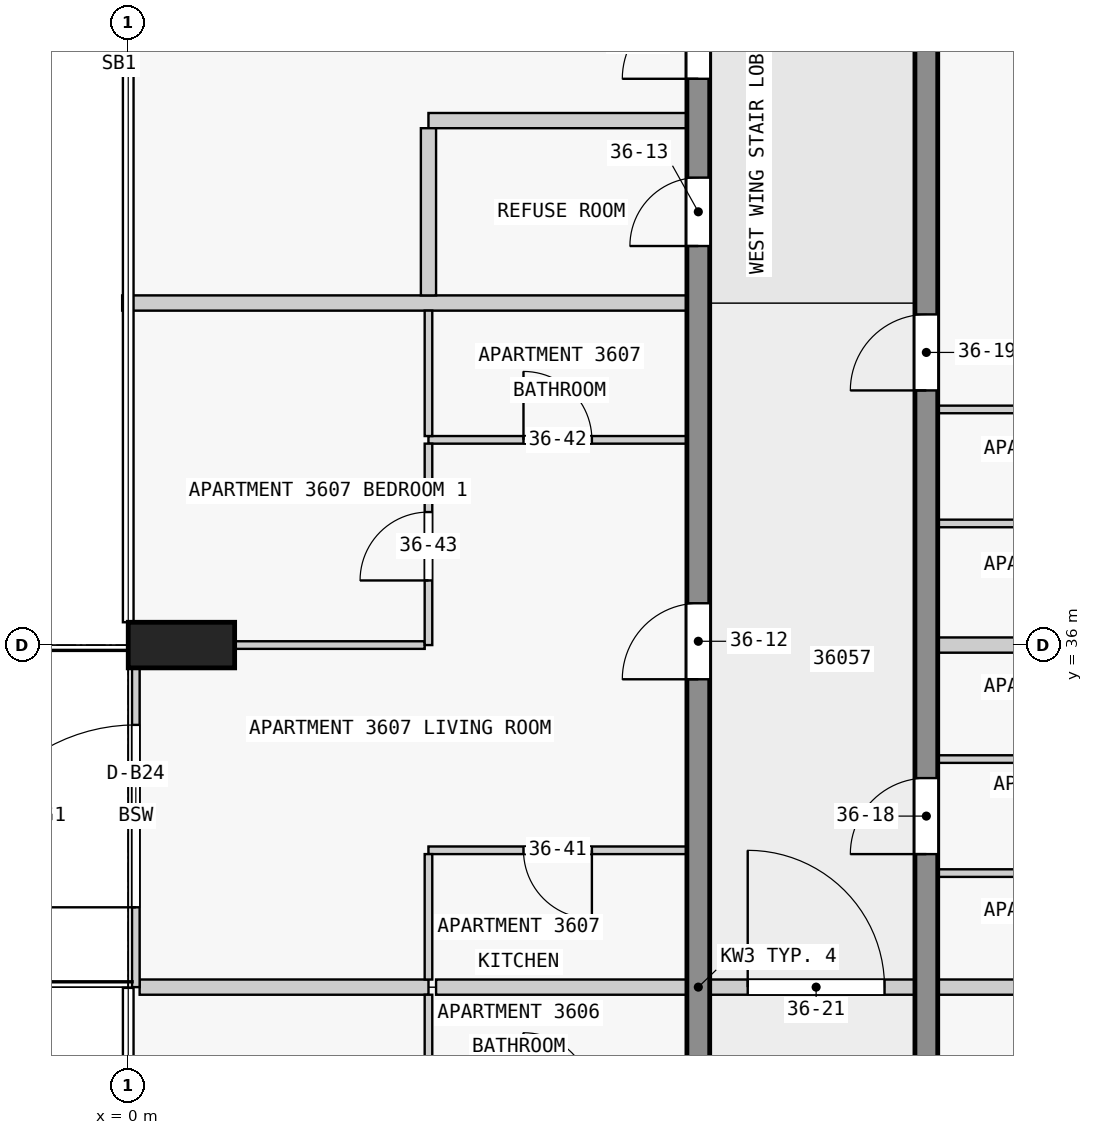
"""IFC4 building model, lengths in metres.
Left out: names, types, materials, properties, quantities, classifications, styles, units other than length and angle.
Written with IfcOpenShell. Run it as: python <this file> out.ifc"""

import sys

from ifc_helpers import new_model, si_unit, direction, frame, frame_2d, origin, origin_2d, place, context, subcontext, project, spatial, rectangle, extrude, element, fill, save


model = new_model("IFC4")
c1 = context("Model", 3, precision=1e-05, world=origin(), true_north=direction((0.0, 1.0)))
c2 = subcontext(c1, "Body", "Model", "MODEL_VIEW")
j1 = project(units=[si_unit("LENGTHUNIT", "METRE"), si_unit("PLANEANGLEUNIT", "RADIAN")], contexts=[c1])
p1 = place(None, origin())
s1 = spatial("IfcSite", under=j1, at=p1, CompositionType="ELEMENT")
p2 = place(p1, origin())
s2 = spatial("IfcBuilding", under=s1, at=p2, CompositionType="ELEMENT")
p3 = place(p2, frame((0.0, 0.0, 142.9)))
s3 = spatial("IfcBuildingStorey", under=s2, at=p3, CompositionType="ELEMENT", Elevation=142.9)
p4 = place(p3, frame((0.7, 36.0, 0.0), z_axis=(0.0, 0.0, 1.0), x_axis=(0.0, 1.0, 0.0)))
e1 = element("IfcColumn", 1, at=p4, inside=s3, PredefinedType="COLUMN", context=c2, shape_type="SweptSolid", body=[
    extrude(rectangle(XDim=0.6, YDim=1.4, at=origin_2d()), origin(), (0.0, 0.0, 1.0), 3.5),
])
p5 = place(p3, frame((7.5, 18.0, 0.0), z_axis=(0.0, 0.0, 1.0), x_axis=(0.0, 1.0, 0.0)))
e2 = element("IfcWall", 2, at=p5, inside=s3, PredefinedType="SHEAR", context=c2, shape_type="SweptSolid", body=[
    extrude(rectangle(XDim=27.0, YDim=0.3, at=frame_2d((13.5, 0.0))), origin(), (0.0, 0.0, 1.0), 3.25),
])
p6 = place(p5, frame((4.05, 0.0, 0.0)))
e3 = element("IfcOpeningElement", 3, at=p6, cuts=e2, PredefinedType="OPENING", context=c2, shape_type="SweptSolid", body=[
    extrude(rectangle(XDim=1.0, YDim=2.1, at=frame_2d((0.5, 1.05))), frame((0.0, 0.16, 0.0), z_axis=(0.0, -1.0, 0.0), x_axis=(1.0, 0.0, 0.0)), (0.0, 0.0, 1.0), 0.32),
])
p7 = place(p5, frame((10.75, 0.0, 0.0)))
e4 = element("IfcOpeningElement", 4, at=p7, cuts=e2, PredefinedType="OPENING", context=c2, shape_type="SweptSolid", body=[
    extrude(rectangle(XDim=1.0, YDim=2.1, at=frame_2d((0.5, 1.05))), frame((0.0, 0.16, 0.0), z_axis=(0.0, -1.0, 0.0), x_axis=(1.0, 0.0, 0.0)), (0.0, 0.0, 1.0), 0.32),
])
p8 = place(p5, frame((17.55, 0.0, 0.0)))
e5 = element("IfcOpeningElement", 5, at=p8, cuts=e2, PredefinedType="OPENING", context=c2, shape_type="SweptSolid", body=[
    extrude(rectangle(XDim=1.0, YDim=2.1, at=frame_2d((0.5, 1.05))), frame((0.0, 0.16, 0.0), z_axis=(0.0, -1.0, 0.0), x_axis=(1.0, 0.0, 0.0)), (0.0, 0.0, 1.0), 0.32),
])
p9 = place(p5, frame((23.25, 0.0, 0.0)))
e6 = element("IfcOpeningElement", 6, at=p9, cuts=e2, PredefinedType="OPENING", context=c2, shape_type="SweptSolid", body=[
    extrude(rectangle(XDim=0.9, YDim=2.1, at=frame_2d((0.45, 1.05))), frame((0.0, 0.16, 0.0), z_axis=(0.0, -1.0, 0.0), x_axis=(1.0, 0.0, 0.0)), (0.0, 0.0, 1.0), 0.32),
])
p10 = place(p5, frame((25.45, 0.0, 0.0)))
e7 = element("IfcOpeningElement", 7, at=p10, cuts=e2, PredefinedType="OPENING", context=c2, shape_type="SweptSolid", body=[
    extrude(rectangle(XDim=1.0, YDim=2.1, at=frame_2d((0.5, 1.05))), frame((0.0, 0.16, 0.0), z_axis=(0.0, -1.0, 0.0), x_axis=(1.0, 0.0, 0.0)), (0.0, 0.0, 1.0), 0.32),
])
p11 = place(p3, frame((10.5, 18.0, 0.0), z_axis=(0.0, 0.0, 1.0), x_axis=(0.0, 1.0, 0.0)))
e8 = element("IfcWall", 8, at=p11, inside=s3, PredefinedType="SHEAR", context=c2, shape_type="SweptSolid", body=[
    extrude(rectangle(XDim=27.0, YDim=0.3, at=frame_2d((13.5, 0.0))), origin(), (0.0, 0.0, 1.0), 3.25),
])
p12 = place(p11, frame((1.75, 0.0, 0.0)))
e9 = element("IfcOpeningElement", 9, at=p12, cuts=e8, PredefinedType="OPENING", context=c2, shape_type="SweptSolid", body=[
    extrude(rectangle(XDim=1.0, YDim=2.1, at=frame_2d((0.5, 1.05))), frame((0.0, 0.16, 0.0), z_axis=(0.0, -1.0, 0.0), x_axis=(1.0, 0.0, 0.0)), (0.0, 0.0, 1.0), 0.32),
])
p13 = place(p11, frame((6.25, 0.0, 0.0)))
e10 = element("IfcOpeningElement", 10, at=p13, cuts=e8, PredefinedType="OPENING", context=c2, shape_type="SweptSolid", body=[
    extrude(rectangle(XDim=1.0, YDim=2.1, at=frame_2d((0.5, 1.05))), frame((0.0, 0.16, 0.0), z_axis=(0.0, -1.0, 0.0), x_axis=(1.0, 0.0, 0.0)), (0.0, 0.0, 1.0), 0.32),
])
p14 = place(p11, frame((10.35, 0.0, 0.0)))
e11 = element("IfcOpeningElement", 11, at=p14, cuts=e8, PredefinedType="OPENING", context=c2, shape_type="SweptSolid", body=[
    extrude(rectangle(XDim=1.8, YDim=2.1, at=frame_2d((0.9, 1.05))), frame((0.0, 0.16, 0.0), z_axis=(0.0, -1.0, 0.0), x_axis=(1.0, 0.0, 0.0)), (0.0, 0.0, 1.0), 0.32),
])
p15 = place(p11, frame((15.25, 0.0, 0.0)))
e12 = element("IfcOpeningElement", 12, at=p15, cuts=e8, PredefinedType="OPENING", context=c2, shape_type="SweptSolid", body=[
    extrude(rectangle(XDim=1.0, YDim=2.1, at=frame_2d((0.5, 1.05))), frame((0.0, 0.16, 0.0), z_axis=(0.0, -1.0, 0.0), x_axis=(1.0, 0.0, 0.0)), (0.0, 0.0, 1.0), 0.32),
])
p16 = place(p11, frame((21.35, 0.0, 0.0)))
e13 = element("IfcOpeningElement", 13, at=p16, cuts=e8, PredefinedType="OPENING", context=c2, shape_type="SweptSolid", body=[
    extrude(rectangle(XDim=1.0, YDim=2.1, at=frame_2d((0.5, 1.05))), frame((0.0, 0.16, 0.0), z_axis=(0.0, -1.0, 0.0), x_axis=(1.0, 0.0, 0.0)), (0.0, 0.0, 1.0), 0.32),
])
p17 = place(p3, frame((0.1, 31.5, 0.0), z_axis=(0.0, 0.0, 1.0), x_axis=(0.0, 1.0, 0.0)))
e14 = element("IfcWall", 14, at=p17, inside=s3, PredefinedType="STANDARD", context=c2, shape_type="SweptSolid", body=[
    extrude(rectangle(XDim=4.5, YDim=0.1, at=frame_2d((2.25, 0.0))), origin(), (0.0, 0.0, 1.0), 3.25),
])
p18 = place(p17, frame((1.05, 0.0, 0.0)))
e15 = element("IfcOpeningElement", 15, at=p18, cuts=e14, PredefinedType="OPENING", context=c2, shape_type="SweptSolid", body=[
    extrude(rectangle(XDim=2.4, YDim=2.4, at=frame_2d((1.2, 1.2))), frame((0.0, 0.06, 0.0), z_axis=(0.0, -1.0, 0.0), x_axis=(1.0, 0.0, 0.0)), (0.0, 0.0, 1.0), 0.12),
])
p19 = place(p3, frame((7.35, 31.5, 0.0), z_axis=(0.0, 0.0, 1.0), x_axis=(-1.0, 0.0, 0.0)))
e16 = element("IfcWall", 16, at=p19, inside=s3, PredefinedType="PARTITIONING", context=c2, shape_type="SweptSolid", body=[
    extrude(rectangle(XDim=3.3, YDim=0.2, at=frame_2d((1.65, 0.0))), origin(), (0.0, 0.0, 1.0), 3.25),
])
p20 = place(p3, frame((17.85, 31.5, 0.0), z_axis=(0.0, 0.0, 1.0), x_axis=(-1.0, 0.0, 0.0)))
e17 = element("IfcWall", 17, at=p20, inside=s3, PredefinedType="PARTITIONING", context=c2, shape_type="SweptSolid", body=[
    extrude(rectangle(XDim=7.2, YDim=0.2, at=frame_2d((3.6, 0.0))), origin(), (0.0, 0.0, 1.0), 3.25),
])
p21 = place(p3, frame((0.15, 31.5, 0.0), z_axis=(0.0, 0.0, 1.0), x_axis=(1.0, 0.0, 0.0)))
e18 = element("IfcWall", 18, at=p21, inside=s3, PredefinedType="PARTITIONING", context=c2, shape_type="SweptSolid", body=[
    extrude(rectangle(XDim=3.8, YDim=0.2, at=frame_2d((1.9, 0.0))), origin(), (0.0, 0.0, 1.0), 3.25),
])
p22 = place(p3, frame((14.05, 33.0, 0.0), z_axis=(0.0, 0.0, 1.0), x_axis=(-1.0, 0.0, 0.0)))
e19 = element("IfcWall", 19, at=p22, inside=s3, PredefinedType="PARTITIONING", context=c2, shape_type="SweptSolid", body=[
    extrude(rectangle(XDim=3.4, YDim=0.1, at=frame_2d((1.7, 0.0))), origin(), (0.0, 0.0, 1.0), 3.25),
])
p23 = place(p22, frame((1.25, 0.0, 0.0)))
e20 = element("IfcOpeningElement", 20, at=p23, cuts=e19, PredefinedType="OPENING", context=c2, shape_type="SweptSolid", body=[
    extrude(rectangle(XDim=0.9, YDim=2.1, at=frame_2d((0.45, 1.05))), frame((0.0, 0.06, 0.0), z_axis=(0.0, -1.0, 0.0), x_axis=(1.0, 0.0, 0.0)), (0.0, 0.0, 1.0), 0.12),
])
p24 = place(p3, frame((7.35, 33.3, 0.0), z_axis=(0.0, 0.0, 1.0), x_axis=(-1.0, 0.0, 0.0)))
e21 = element("IfcWall", 21, at=p24, inside=s3, PredefinedType="PARTITIONING", context=c2, shape_type="SweptSolid", body=[
    extrude(rectangle(XDim=3.4, YDim=0.1, at=frame_2d((1.7, 0.0))), origin(), (0.0, 0.0, 1.0), 3.25),
])
p25 = place(p24, frame((1.25, 0.0, 0.0)))
e22 = element("IfcOpeningElement", 22, at=p25, cuts=e21, PredefinedType="OPENING", context=c2, shape_type="SweptSolid", body=[
    extrude(rectangle(XDim=0.9, YDim=2.1, at=frame_2d((0.45, 1.05))), frame((0.0, 0.06, 0.0), z_axis=(0.0, -1.0, 0.0), x_axis=(1.0, 0.0, 0.0)), (0.0, 0.0, 1.0), 0.12),
])
p26 = place(p3, frame((10.65, 34.5, 0.0), z_axis=(0.0, 0.0, 1.0), x_axis=(1.0, 0.0, 0.0)))
e23 = element("IfcWall", 23, at=p26, inside=s3, PredefinedType="PARTITIONING", context=c2, shape_type="SweptSolid", body=[
    extrude(rectangle(XDim=3.35, YDim=0.1, at=frame_2d((1.675, 0.0))), origin(), (0.0, 0.0, 1.0), 3.25),
])
p27 = place(p26, frame((1.25, 0.0, 0.0)))
e24 = element("IfcOpeningElement", 24, at=p27, cuts=e23, PredefinedType="OPENING", context=c2, shape_type="SweptSolid", body=[
    extrude(rectangle(XDim=0.9, YDim=2.1, at=frame_2d((0.45, 1.05))), frame((0.0, 0.06, 0.0), z_axis=(0.0, -1.0, 0.0), x_axis=(1.0, 0.0, 0.0)), (0.0, 0.0, 1.0), 0.12),
])
p28 = place(p3, frame((1.4, 36.0, 0.0), z_axis=(0.0, 0.0, 1.0), x_axis=(1.0, 0.0, 0.0)))
e25 = element("IfcWall", 25, at=p28, inside=s3, PredefinedType="PARTITIONING", context=c2, shape_type="SweptSolid", body=[
    extrude(rectangle(XDim=2.5, YDim=0.1, at=frame_2d((1.25, 0.0))), origin(), (0.0, 0.0, 1.0), 3.25),
])
p29 = place(p3, frame((14.05, 36.0, 0.0), z_axis=(0.0, 0.0, 1.0), x_axis=(-1.0, 0.0, 0.0)))
e26 = element("IfcWall", 26, at=p29, inside=s3, PredefinedType="PARTITIONING", context=c2, shape_type="SweptSolid", body=[
    extrude(rectangle(XDim=3.4, YDim=0.2, at=frame_2d((1.7, 0.0))), origin(), (0.0, 0.0, 1.0), 3.25),
])
p30 = place(p3, frame((14.0, 37.6, 0.0), z_axis=(0.0, 0.0, 1.0), x_axis=(-1.0, 0.0, 0.0)))
e27 = element("IfcWall", 27, at=p30, inside=s3, PredefinedType="PARTITIONING", context=c2, shape_type="SweptSolid", body=[
    extrude(rectangle(XDim=3.35, YDim=0.1, at=frame_2d((1.675, 0.0))), origin(), (0.0, 0.0, 1.0), 3.25),
])
p31 = place(p3, frame((3.95, 38.7, 0.0), z_axis=(0.0, 0.0, 1.0), x_axis=(1.0, 0.0, 0.0)))
e28 = element("IfcWall", 28, at=p31, inside=s3, PredefinedType="PARTITIONING", context=c2, shape_type="SweptSolid", body=[
    extrude(rectangle(XDim=3.4, YDim=0.1, at=frame_2d((1.7, 0.0))), origin(), (0.0, 0.0, 1.0), 3.25),
])
p32 = place(p31, frame((1.25, 0.0, 0.0)))
e29 = element("IfcOpeningElement", 29, at=p32, cuts=e28, PredefinedType="OPENING", context=c2, shape_type="SweptSolid", body=[
    extrude(rectangle(XDim=0.9, YDim=2.1, at=frame_2d((0.45, 1.05))), frame((0.0, 0.06, 0.0), z_axis=(0.0, -1.0, 0.0), x_axis=(1.0, 0.0, 0.0)), (0.0, 0.0, 1.0), 0.12),
])
p33 = place(p3, frame((14.0, 39.1, 0.0), z_axis=(0.0, 0.0, 1.0), x_axis=(-1.0, 0.0, 0.0)))
e30 = element("IfcWall", 30, at=p33, inside=s3, PredefinedType="PARTITIONING", context=c2, shape_type="SweptSolid", body=[
    extrude(rectangle(XDim=3.35, YDim=0.1, at=frame_2d((1.675, 0.0))), origin(), (0.0, 0.0, 1.0), 3.25),
])
p34 = place(p33, frame((1.25, 0.0, 0.0)))
e31 = element("IfcOpeningElement", 31, at=p34, cuts=e30, PredefinedType="OPENING", context=c2, shape_type="SweptSolid", body=[
    extrude(rectangle(XDim=0.9, YDim=2.1, at=frame_2d((0.45, 1.05))), frame((0.0, 0.06, 0.0), z_axis=(0.0, -1.0, 0.0), x_axis=(1.0, 0.0, 0.0)), (0.0, 0.0, 1.0), 0.12),
])
p35 = place(p3, frame((7.35, 40.5, 0.0), z_axis=(0.0, 0.0, 1.0), x_axis=(-1.0, 0.0, 0.0)))
e32 = element("IfcWall", 32, at=p35, inside=s3, PredefinedType="PARTITIONING", context=c2, shape_type="SweptSolid", body=[
    extrude(rectangle(XDim=7.43, YDim=0.2, at=frame_2d((3.715, 0.0))), origin(), (0.0, 0.0, 1.0), 3.25),
])
p36 = place(p3, frame((7.35, 42.9, 0.0), z_axis=(0.0, 0.0, 1.0), x_axis=(-1.0, 0.0, 0.0)))
e33 = element("IfcWall", 33, at=p36, inside=s3, PredefinedType="PARTITIONING", context=c2, shape_type="SweptSolid", body=[
    extrude(rectangle(XDim=3.4, YDim=0.2, at=frame_2d((1.7, 0.0))), origin(), (0.0, 0.0, 1.0), 3.25),
])
p37 = place(p3, frame((3.95, 31.4, 0.0), z_axis=(0.0, 0.0, 1.0), x_axis=(0.0, -1.0, 0.0)))
e34 = element("IfcWall", 34, at=p37, inside=s3, PredefinedType="PARTITIONING", context=c2, shape_type="SweptSolid", body=[
    extrude(rectangle(XDim=1.35, YDim=0.1, at=frame_2d((0.675, 0.0))), origin(), (0.0, 0.0, 1.0), 3.25),
])
for number, where, z_axis, x_axis in (
    (35, (3.95, 33.25, 0.0), (0.0, 0.0, 1.0), (0.0, -1.0, 0.0)),
    (36, (3.95, 40.4, 0.0), (0.0, 0.0, 1.0), (0.0, -1.0, 0.0)),
):
    element("IfcWall", number, at=place(p3, frame(where, z_axis=z_axis, x_axis=x_axis)), inside=s3, PredefinedType="PARTITIONING", context=c2, shape_type="SweptSolid", body=[
        extrude(rectangle(XDim=1.65, YDim=0.1, at=frame_2d((0.825, 0.0))), origin(), (0.0, 0.0, 1.0), 3.25),
    ])
p38 = place(p3, frame((3.95, 36.0, 0.0), z_axis=(0.0, 0.0, 1.0), x_axis=(0.0, 1.0, 0.0)))
e37 = element("IfcWall", 37, at=p38, inside=s3, PredefinedType="PARTITIONING", context=c2, shape_type="SweptSolid", body=[
    extrude(rectangle(XDim=2.65, YDim=0.1, at=frame_2d((1.325, 0.0))), origin(), (0.0, 0.0, 1.0), 3.25),
])
p39 = place(p38, frame((0.85, 0.0, 0.0)))
e38 = element("IfcOpeningElement", 38, at=p39, cuts=e37, PredefinedType="OPENING", context=c2, shape_type="SweptSolid", body=[
    extrude(rectangle(XDim=0.9, YDim=2.1, at=frame_2d((0.45, 1.05))), frame((0.0, 0.06, 0.0), z_axis=(0.0, -1.0, 0.0), x_axis=(1.0, 0.0, 0.0)), (0.0, 0.0, 1.0), 0.12),
])
p40 = place(p3, frame((3.95, 42.8, 0.0), z_axis=(0.0, 0.0, 1.0), x_axis=(0.0, -1.0, 0.0)))
e39 = element("IfcWall", 39, at=p40, inside=s3, PredefinedType="PARTITIONING", context=c2, shape_type="SweptSolid", body=[
    extrude(rectangle(XDim=2.2, YDim=0.2, at=frame_2d((1.1, 0.0))), origin(), (0.0, 0.0, 1.0), 3.25),
])
p41 = place(p3, frame((7.45, 31.5, 0.0), z_axis=(0.0, 0.0, 1.0), x_axis=(1.0, 0.0, 0.0)))
e40 = element("IfcWall", 40, at=p41, inside=s3, PredefinedType="PARTITIONING", context=c2, shape_type="SweptSolid", body=[
    extrude(rectangle(XDim=3.1, YDim=0.2, at=frame_2d((1.55, 0.0))), origin(), (0.0, 0.0, 1.0), 3.25),
])
p42 = place(p41, frame((0.7, 0.0, 0.0)))
e41 = element("IfcOpeningElement", 41, at=p42, cuts=e40, PredefinedType="OPENING", context=c2, shape_type="SweptSolid", body=[
    extrude(rectangle(XDim=1.8, YDim=2.1, at=frame_2d((0.9, 1.05))), frame((0.0, 0.11, 0.0), z_axis=(0.0, -1.0, 0.0), x_axis=(1.0, 0.0, 0.0)), (0.0, 0.0, 1.0), 0.22),
])
p43 = place(p18, origin())
e42 = element("IfcDoor", 42, at=p43, inside=s3, OperationType="SINGLE_SWING_LEFT", PredefinedType="DOOR", context=c2, shape_type="SweptSolid", body=[
    extrude(rectangle(XDim=2.4, YDim=2.4, at=frame_2d((1.2, 1.2))), frame((0.0, 0.025, 0.0), z_axis=(0.0, -1.0, 0.0), x_axis=(1.0, 0.0, 0.0)), (0.0, 0.0, 1.0), 0.05),
])
fill(e15, e42)
p44 = place(p8, origin())
e43 = element("IfcDoor", 43, at=p44, inside=s3, OperationType="SINGLE_SWING_RIGHT", PredefinedType="DOOR", context=c2, shape_type="SweptSolid", body=[
    extrude(rectangle(XDim=1.0, YDim=2.1, at=frame_2d((0.5, 1.05))), frame((0.0, 0.025, 0.0), z_axis=(0.0, -1.0, 0.0), x_axis=(1.0, 0.0, 0.0)), (0.0, 0.0, 1.0), 0.05),
])
fill(e5, e43)
p45 = place(p9, origin())
e44 = element("IfcDoor", 44, at=p45, inside=s3, OperationType="SINGLE_SWING_RIGHT", PredefinedType="DOOR", context=c2, shape_type="SweptSolid", body=[
    extrude(rectangle(XDim=0.9, YDim=2.1, at=frame_2d((0.45, 1.05))), frame((0.0, 0.025, 0.0), z_axis=(0.0, -1.0, 0.0), x_axis=(1.0, 0.0, 0.0)), (0.0, 0.0, 1.0), 0.05),
])
fill(e6, e44)
p46 = place(p10, origin())
e45 = element("IfcDoor", 45, at=p46, inside=s3, OperationType="SINGLE_SWING_RIGHT", PredefinedType="DOOR", context=c2, shape_type="SweptSolid", body=[
    extrude(rectangle(XDim=1.0, YDim=2.1, at=frame_2d((0.5, 1.05))), frame((0.0, 0.025, 0.0), z_axis=(0.0, -1.0, 0.0), x_axis=(1.0, 0.0, 0.0)), (0.0, 0.0, 1.0), 0.05),
])
fill(e7, e45)
p47 = place(p15, origin())
e46 = element("IfcDoor", 46, at=p47, inside=s3, OperationType="SINGLE_SWING_RIGHT", PredefinedType="DOOR", context=c2, shape_type="SweptSolid", body=[
    extrude(rectangle(XDim=1.0, YDim=2.1, at=frame_2d((0.5, 1.05))), frame((0.0, 0.025, 0.0), z_axis=(0.0, -1.0, 0.0), x_axis=(1.0, 0.0, 0.0)), (0.0, 0.0, 1.0), 0.05),
])
fill(e12, e46)
p48 = place(p16, origin())
e47 = element("IfcDoor", 47, at=p48, inside=s3, OperationType="SINGLE_SWING_RIGHT", PredefinedType="DOOR", context=c2, shape_type="SweptSolid", body=[
    extrude(rectangle(XDim=1.0, YDim=2.1, at=frame_2d((0.5, 1.05))), frame((0.0, 0.025, 0.0), z_axis=(0.0, -1.0, 0.0), x_axis=(1.0, 0.0, 0.0)), (0.0, 0.0, 1.0), 0.05),
])
fill(e13, e47)
p49 = place(p42, origin())
e48 = element("IfcDoor", 48, at=p49, inside=s3, OperationType="SINGLE_SWING_RIGHT", PredefinedType="DOOR", context=c2, shape_type="SweptSolid", body=[
    extrude(rectangle(XDim=1.8, YDim=2.1, at=frame_2d((0.9, 1.05))), frame((0.0, 0.025, 0.0), z_axis=(0.0, -1.0, 0.0), x_axis=(1.0, 0.0, 0.0)), (0.0, 0.0, 1.0), 0.05),
])
fill(e41, e48)
p50 = place(p25, origin())
e49 = element("IfcDoor", 49, at=p50, inside=s3, OperationType="SINGLE_SWING_RIGHT", PredefinedType="DOOR", context=c2, shape_type="SweptSolid", body=[
    extrude(rectangle(XDim=0.9, YDim=2.1, at=frame_2d((0.45, 1.05))), frame((0.0, 0.025, 0.0), z_axis=(0.0, -1.0, 0.0), x_axis=(1.0, 0.0, 0.0)), (0.0, 0.0, 1.0), 0.05),
])
fill(e22, e49)
p51 = place(p32, origin())
e50 = element("IfcDoor", 50, at=p51, inside=s3, OperationType="SINGLE_SWING_RIGHT", PredefinedType="DOOR", context=c2, shape_type="SweptSolid", body=[
    extrude(rectangle(XDim=0.9, YDim=2.1, at=frame_2d((0.45, 1.05))), frame((0.0, 0.025, 0.0), z_axis=(0.0, -1.0, 0.0), x_axis=(1.0, 0.0, 0.0)), (0.0, 0.0, 1.0), 0.05),
])
fill(e29, e50)
p52 = place(p39, origin())
e51 = element("IfcDoor", 51, at=p52, inside=s3, OperationType="SINGLE_SWING_LEFT", PredefinedType="DOOR", context=c2, shape_type="SweptSolid", body=[
    extrude(rectangle(XDim=0.9, YDim=2.1, at=frame_2d((0.45, 1.05))), frame((0.0, 0.025, 0.0), z_axis=(0.0, -1.0, 0.0), x_axis=(1.0, 0.0, 0.0)), (0.0, 0.0, 1.0), 0.05),
])
fill(e38, e51)
save(model, sys.argv[1])
